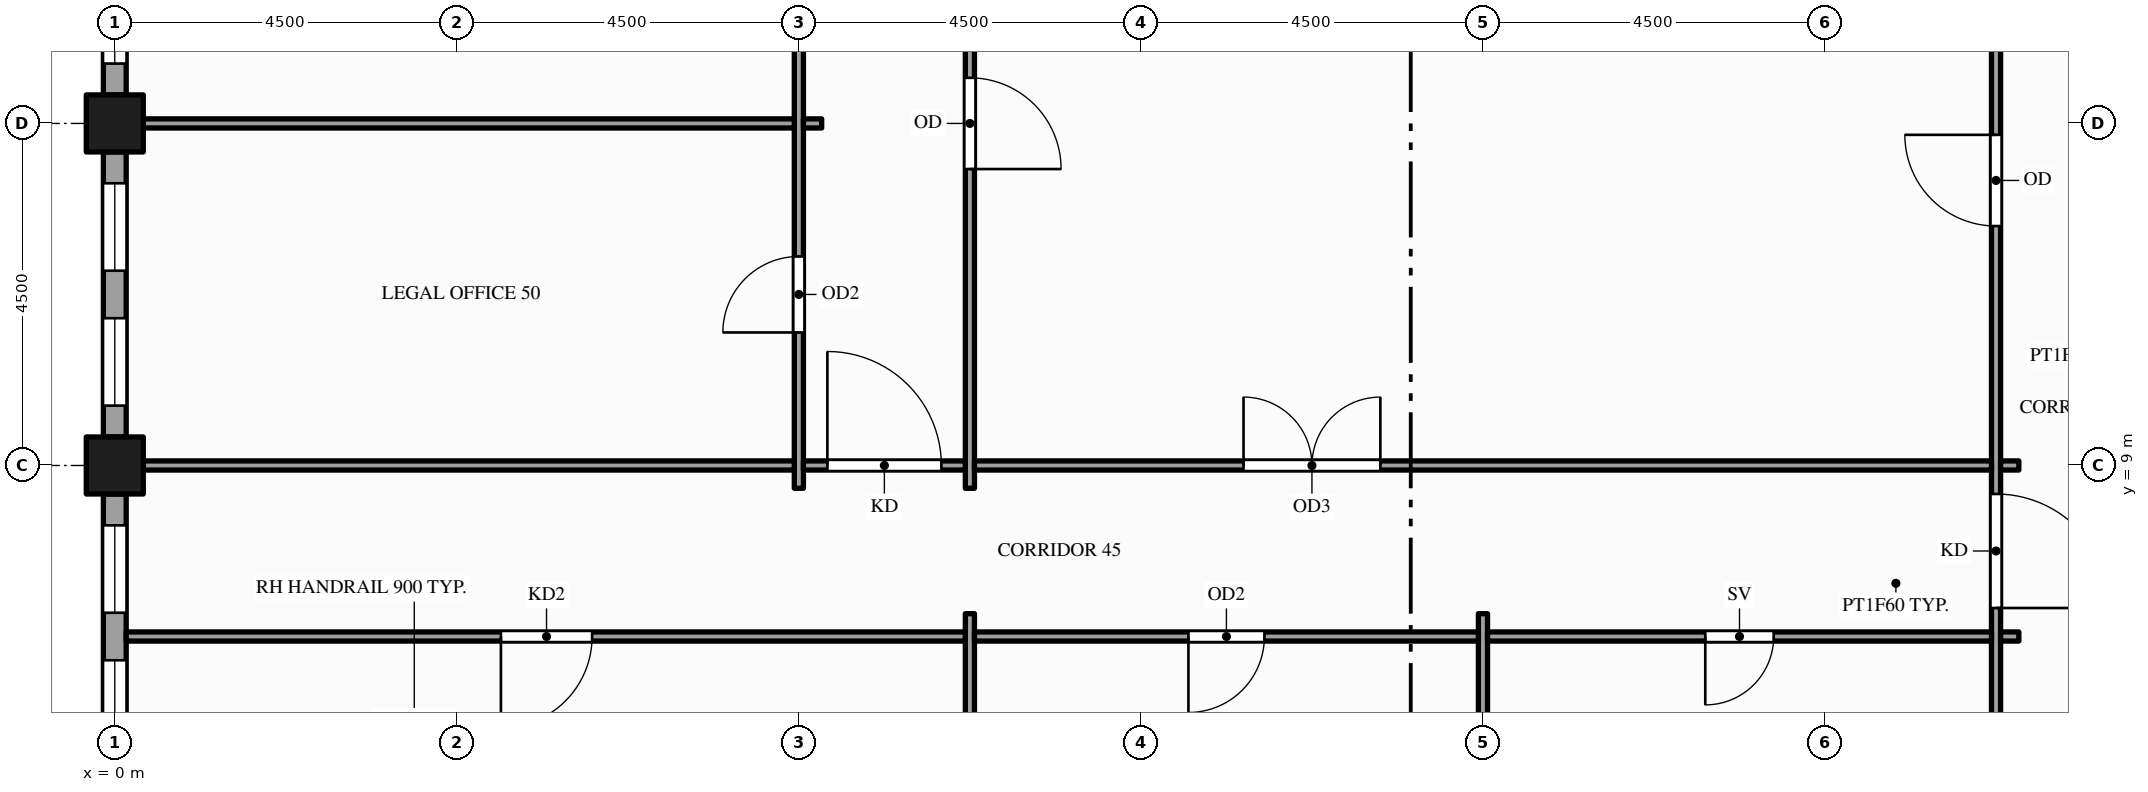
"""IFC4 building model, lengths in metres.
Left out: names, types, materials, properties, quantities, classifications, styles, units other than length and angle.
Written with IfcOpenShell. Run it as: python <this file> out.ifc"""

import sys

from ifc_helpers import new_model, si_unit, direction, frame, frame_2d, origin, origin_2d, place, context, subcontext, project, spatial, rectangle, hollow_rectangle, extrude, element, fill, save


model = new_model("IFC4")
c1 = context("Model", 3, precision=1e-05, world=origin(), true_north=direction((0.0, 1.0)))
c2 = subcontext(c1, "Body", "Model", "MODEL_VIEW")
j1 = project(units=[si_unit("LENGTHUNIT", "METRE"), si_unit("PLANEANGLEUNIT", "RADIAN")], contexts=[c1])
p1 = place(None, origin())
s1 = spatial("IfcSite", under=j1, at=p1, CompositionType="ELEMENT")
p2 = place(p1, origin())
s2 = spatial("IfcBuilding", under=s1, at=p2, CompositionType="ELEMENT")
p3 = place(p2, frame((0.0, 0.0, 223.0)))
s3 = spatial("IfcBuildingStorey", under=s2, at=p3, CompositionType="ELEMENT", Elevation=223.0)
for number, where, z_axis, x_axis in (
    (1, (0.0, 9.0, -0.15), (0.0, 0.0, 1.0), (1.0, 0.0, 0.0)),
    (2, (0.0, 13.5, -0.15), (0.0, 0.0, 1.0), (1.0, 0.0, 0.0)),
):
    element("IfcColumn", number, at=place(p3, frame(where, z_axis=z_axis, x_axis=x_axis)), inside=s3, PredefinedType="COLUMN", context=c2, shape_type="SweptSolid", body=[
        extrude(hollow_rectangle(XDim=0.75, YDim=0.75, WallThickness=0.036, at=origin_2d()), origin(), (0.0, 0.0, 1.0), 4.0),
    ])
p4 = place(p3, frame((0.0, 17.625, 0.0), z_axis=(0.0, 0.0, 1.0), x_axis=(0.0, -1.0, 0.0)))
e3 = element("IfcWall", 3, at=p4, inside=s3, PredefinedType="STANDARD", context=c2, shape_type="SweptSolid", body=[
    extrude(rectangle(XDim=3.75, YDim=0.3, at=frame_2d((1.875, 0.0))), origin(), (0.0, 0.0, 1.0), 3.157),
])
p5 = place(p4, frame((0.413, 0.0, 0.9)))
e4 = element("IfcOpeningElement", 4, at=p5, cuts=e3, PredefinedType="OPENING", context=c2, shape_type="SweptSolid", body=[
    extrude(rectangle(XDim=1.15, YDim=2.0, at=frame_2d((0.575, 1.0))), frame((0.0, 0.16, 0.0), z_axis=(0.0, -1.0, 0.0), x_axis=(1.0, 0.0, 0.0)), (0.0, 0.0, 1.0), 0.32),
])
p6 = place(p4, frame((2.188, 0.0, 0.9)))
e5 = element("IfcOpeningElement", 5, at=p6, cuts=e3, PredefinedType="OPENING", context=c2, shape_type="SweptSolid", body=[
    extrude(rectangle(XDim=1.15, YDim=2.0, at=frame_2d((0.575, 1.0))), frame((0.0, 0.16, 0.0), z_axis=(0.0, -1.0, 0.0), x_axis=(1.0, 0.0, 0.0)), (0.0, 0.0, 1.0), 0.32),
])
p7 = place(p3, frame((0.0, 13.125, 0.0), z_axis=(0.0, 0.0, 1.0), x_axis=(0.0, -1.0, 0.0)))
e6 = element("IfcWall", 6, at=p7, inside=s3, PredefinedType="STANDARD", context=c2, shape_type="SweptSolid", body=[
    extrude(rectangle(XDim=3.75, YDim=0.3, at=frame_2d((1.875, 0.0))), origin(), (0.0, 0.0, 1.0), 3.157),
])
p8 = place(p7, frame((0.413, 0.0, 0.9)))
e7 = element("IfcOpeningElement", 7, at=p8, cuts=e6, PredefinedType="OPENING", context=c2, shape_type="SweptSolid", body=[
    extrude(rectangle(XDim=1.15, YDim=2.0, at=frame_2d((0.575, 1.0))), frame((0.0, 0.16, 0.0), z_axis=(0.0, -1.0, 0.0), x_axis=(1.0, 0.0, 0.0)), (0.0, 0.0, 1.0), 0.32),
])
p9 = place(p7, frame((2.188, 0.0, 0.9)))
e8 = element("IfcOpeningElement", 8, at=p9, cuts=e6, PredefinedType="OPENING", context=c2, shape_type="SweptSolid", body=[
    extrude(rectangle(XDim=1.15, YDim=2.0, at=frame_2d((0.575, 1.0))), frame((0.0, 0.16, 0.0), z_axis=(0.0, -1.0, 0.0), x_axis=(1.0, 0.0, 0.0)), (0.0, 0.0, 1.0), 0.32),
])
p10 = place(p3, frame((0.0, 8.625, 0.0), z_axis=(0.0, 0.0, 1.0), x_axis=(0.0, -1.0, 0.0)))
e9 = element("IfcWall", 9, at=p10, inside=s3, PredefinedType="STANDARD", context=c2, shape_type="SweptSolid", body=[
    extrude(rectangle(XDim=3.75, YDim=0.3, at=frame_2d((1.875, 0.0))), origin(), (0.0, 0.0, 1.0), 3.157),
])
p11 = place(p10, frame((0.413, 0.0, 0.9)))
e10 = element("IfcOpeningElement", 10, at=p11, cuts=e9, PredefinedType="OPENING", context=c2, shape_type="SweptSolid", body=[
    extrude(rectangle(XDim=1.15, YDim=2.0, at=frame_2d((0.575, 1.0))), frame((0.0, 0.16, 0.0), z_axis=(0.0, -1.0, 0.0), x_axis=(1.0, 0.0, 0.0)), (0.0, 0.0, 1.0), 0.32),
])
p12 = place(p10, frame((2.188, 0.0, 0.9)))
e11 = element("IfcOpeningElement", 11, at=p12, cuts=e9, PredefinedType="OPENING", context=c2, shape_type="SweptSolid", body=[
    extrude(rectangle(XDim=1.15, YDim=2.0, at=frame_2d((0.575, 1.0))), frame((0.0, 0.16, 0.0), z_axis=(0.0, -1.0, 0.0), x_axis=(1.0, 0.0, 0.0)), (0.0, 0.0, 1.0), 0.32),
])
p13 = place(p3, frame((9.0, 8.7, 0.0), z_axis=(0.0, 0.0, 1.0), x_axis=(0.0, 1.0, 0.0)))
e12 = element("IfcWall", 12, at=p13, inside=s3, PredefinedType="PARTITIONING", context=c2, shape_type="SweptSolid", body=[
    extrude(rectangle(XDim=23.1, YDim=0.12, at=frame_2d((11.55, 0.0))), origin(), (0.0, 0.0, 1.0), 2.6),
])
p14 = place(p13, frame((2.05, 0.0, 0.0)))
e13 = element("IfcOpeningElement", 13, at=p14, cuts=e12, PredefinedType="OPENING", context=c2, shape_type="SweptSolid", body=[
    extrude(rectangle(XDim=1.0, YDim=2.1, at=frame_2d((0.5, 1.05))), frame((0.0, 0.07, 0.0), z_axis=(0.0, -1.0, 0.0), x_axis=(1.0, 0.0, 0.0)), (0.0, 0.0, 1.0), 0.14),
])
p15 = place(p13, frame((7.675, 0.0, 0.0)))
e14 = element("IfcOpeningElement", 14, at=p15, cuts=e12, PredefinedType="OPENING", context=c2, shape_type="SweptSolid", body=[
    extrude(rectangle(XDim=1.0, YDim=2.1, at=frame_2d((0.5, 1.05))), frame((0.0, 0.07, 0.0), z_axis=(0.0, -1.0, 0.0), x_axis=(1.0, 0.0, 0.0)), (0.0, 0.0, 1.0), 0.14),
])
p16 = place(p13, frame((14.455, 0.0, 0.0)))
e15 = element("IfcOpeningElement", 15, at=p16, cuts=e12, PredefinedType="OPENING", context=c2, shape_type="SweptSolid", body=[
    extrude(rectangle(XDim=1.0, YDim=2.1, at=frame_2d((0.5, 1.05))), frame((0.0, 0.07, 0.0), z_axis=(0.0, -1.0, 0.0), x_axis=(1.0, 0.0, 0.0)), (0.0, 0.0, 1.0), 0.14),
])
p17 = place(p3, frame((11.25, 0.15, 0.0), z_axis=(0.0, 0.0, 1.0), x_axis=(0.0, 1.0, 0.0)))
e16 = element("IfcWall", 16, at=p17, inside=s3, PredefinedType="PARTITIONING", context=c2, shape_type="SweptSolid", body=[
    extrude(rectangle(XDim=6.9, YDim=0.12, at=frame_2d((3.45, 0.0))), origin(), (0.0, 0.0, 1.0), 2.87),
])
p18 = place(p3, frame((11.25, 8.7, 0.0), z_axis=(0.0, 0.0, 1.0), x_axis=(0.0, 1.0, 0.0)))
e17 = element("IfcWall", 17, at=p18, inside=s3, PredefinedType="PARTITIONING", context=c2, shape_type="SweptSolid", body=[
    extrude(rectangle(XDim=23.1, YDim=0.12, at=frame_2d((11.55, 0.0))), origin(), (0.0, 0.0, 1.0), 2.6),
])
p19 = place(p18, frame((18.825, 0.0, 0.0)))
e18 = element("IfcOpeningElement", 18, at=p19, cuts=e17, PredefinedType="OPENING", context=c2, shape_type="SweptSolid", body=[
    extrude(rectangle(XDim=1.2, YDim=2.1, at=frame_2d((0.6, 1.05))), frame((0.0, 0.07, 0.0), z_axis=(0.0, -1.0, 0.0), x_axis=(1.0, 0.0, 0.0)), (0.0, 0.0, 1.0), 0.14),
])
p20 = place(p18, frame((4.2, 0.0, 0.0)))
e19 = element("IfcOpeningElement", 19, at=p20, cuts=e17, PredefinedType="OPENING", context=c2, shape_type="SweptSolid", body=[
    extrude(rectangle(XDim=1.2, YDim=2.1, at=frame_2d((0.6, 1.05))), frame((0.0, 0.07, 0.0), z_axis=(0.0, -1.0, 0.0), x_axis=(1.0, 0.0, 0.0)), (0.0, 0.0, 1.0), 0.14),
])
p21 = place(p3, frame((18.0, 0.15, 0.0), z_axis=(0.0, 0.0, 1.0), x_axis=(0.0, 1.0, 0.0)))
e20 = element("IfcWall", 20, at=p21, inside=s3, PredefinedType="PARTITIONING", context=c2, shape_type="SweptSolid", body=[
    extrude(rectangle(XDim=6.9, YDim=0.12, at=frame_2d((3.45, 0.0))), origin(), (0.0, 0.0, 1.0), 2.87),
])
p22 = place(p3, frame((24.75, -1.35, 0.0), z_axis=(0.0, 0.0, 1.0), x_axis=(0.0, 1.0, 0.0)))
e21 = element("IfcWall", 21, at=p22, inside=s3, PredefinedType="PARTITIONING", context=c2, shape_type="SweptSolid", body=[
    extrude(rectangle(XDim=24.101, YDim=0.12, at=frame_2d((12.05, 0.0))), origin(), (0.0, 0.0, 1.0), 2.76),
])
p23 = place(p22, frame((8.475, 0.0, 0.0)))
e22 = element("IfcOpeningElement", 22, at=p23, cuts=e21, PredefinedType="OPENING", context=c2, shape_type="SweptSolid", body=[
    extrude(rectangle(XDim=1.5, YDim=2.1, at=frame_2d((0.75, 1.05))), frame((0.0, 0.07, 0.0), z_axis=(0.0, -1.0, 0.0), x_axis=(1.0, 0.0, 0.0)), (0.0, 0.0, 1.0), 0.14),
])
p24 = place(p22, frame((13.5, 0.0, 0.0)))
e23 = element("IfcOpeningElement", 23, at=p24, cuts=e21, PredefinedType="OPENING", context=c2, shape_type="SweptSolid", body=[
    extrude(rectangle(XDim=1.2, YDim=2.1, at=frame_2d((0.6, 1.05))), frame((0.0, 0.07, 0.0), z_axis=(0.0, -1.0, 0.0), x_axis=(1.0, 0.0, 0.0)), (0.0, 0.0, 1.0), 0.14),
])
p25 = place(p3, frame((0.15, 6.75, 0.0), z_axis=(0.0, 0.0, 1.0), x_axis=(1.0, 0.0, 0.0)))
e24 = element("IfcWall", 24, at=p25, inside=s3, PredefinedType="PARTITIONING", context=c2, shape_type="SweptSolid", body=[
    extrude(rectangle(XDim=11.04, YDim=0.12, at=frame_2d((5.52, 0.0))), origin(), (0.0, 0.0, 1.0), 2.87),
])
p26 = place(p25, frame((4.93, 0.0, 0.0)))
e25 = element("IfcOpeningElement", 25, at=p26, cuts=e24, PredefinedType="OPENING", context=c2, shape_type="SweptSolid", body=[
    extrude(rectangle(XDim=1.2, YDim=2.1, at=frame_2d((0.6, 1.05))), frame((0.0, 0.07, 0.0), z_axis=(0.0, -1.0, 0.0), x_axis=(1.0, 0.0, 0.0)), (0.0, 0.0, 1.0), 0.14),
])
p27 = place(p3, frame((11.31, 6.75, 0.0), z_axis=(0.0, 0.0, 1.0), x_axis=(1.0, 0.0, 0.0)))
e26 = element("IfcWall", 26, at=p27, inside=s3, PredefinedType="PARTITIONING", context=c2, shape_type="SweptSolid", body=[
    extrude(rectangle(XDim=6.63, YDim=0.12, at=frame_2d((3.315, 0.0))), origin(), (0.0, 0.0, 1.0), 2.87),
])
p28 = place(p27, frame((2.815, 0.0, 0.0)))
e27 = element("IfcOpeningElement", 27, at=p28, cuts=e26, PredefinedType="OPENING", context=c2, shape_type="SweptSolid", body=[
    extrude(rectangle(XDim=1.0, YDim=2.1, at=frame_2d((0.5, 1.05))), frame((0.0, 0.07, 0.0), z_axis=(0.0, -1.0, 0.0), x_axis=(1.0, 0.0, 0.0)), (0.0, 0.0, 1.0), 0.14),
])
p29 = place(p3, frame((18.06, 6.75, 0.0), z_axis=(0.0, 0.0, 1.0), x_axis=(1.0, 0.0, 0.0)))
e28 = element("IfcWall", 28, at=p29, inside=s3, PredefinedType="PARTITIONING", context=c2, shape_type="SweptSolid", body=[
    extrude(rectangle(XDim=6.63, YDim=0.12, at=frame_2d((3.315, 0.0))), origin(), (0.0, 0.0, 1.0), 2.76),
])
p30 = place(p29, frame((2.865, 0.0, 0.0)))
e29 = element("IfcOpeningElement", 29, at=p30, cuts=e28, PredefinedType="OPENING", context=c2, shape_type="SweptSolid", body=[
    extrude(rectangle(XDim=0.9, YDim=2.1, at=frame_2d((0.45, 1.05))), frame((0.0, 0.07, 0.0), z_axis=(0.0, -1.0, 0.0), x_axis=(1.0, 0.0, 0.0)), (0.0, 0.0, 1.0), 0.14),
])
p31 = place(p3, frame((24.81, 6.75, 0.0), z_axis=(0.0, 0.0, 1.0), x_axis=(1.0, 0.0, 0.0)))
e30 = element("IfcWall", 30, at=p31, inside=s3, PredefinedType="PARTITIONING", context=c2, shape_type="SweptSolid", body=[
    extrude(rectangle(XDim=0.24, YDim=0.12, at=frame_2d((0.12, 0.0))), origin(), (0.0, 0.0, 1.0), 2.76),
])
p32 = place(p3, frame((0.15, 9.0, 0.0), z_axis=(0.0, 0.0, 1.0), x_axis=(1.0, 0.0, 0.0)))
e31 = element("IfcWall", 31, at=p32, inside=s3, PredefinedType="PARTITIONING", context=c2, shape_type="SweptSolid", body=[
    extrude(rectangle(XDim=8.79, YDim=0.12, at=frame_2d((4.395, 0.0))), origin(), (0.0, 0.0, 1.0), 2.87),
])
p33 = place(p3, frame((9.06, 9.0, 0.0), z_axis=(0.0, 0.0, 1.0), x_axis=(1.0, 0.0, 0.0)))
e32 = element("IfcWall", 32, at=p33, inside=s3, PredefinedType="PARTITIONING", context=c2, shape_type="SweptSolid", body=[
    extrude(rectangle(XDim=2.13, YDim=0.12, at=frame_2d((1.065, 0.0))), origin(), (0.0, 0.0, 1.0), 2.87),
])
p34 = place(p33, frame((0.315, 0.0, 0.0)))
e33 = element("IfcOpeningElement", 33, at=p34, cuts=e32, PredefinedType="OPENING", context=c2, shape_type="SweptSolid", body=[
    extrude(rectangle(XDim=1.5, YDim=2.1, at=frame_2d((0.75, 1.05))), frame((0.0, 0.07, 0.0), z_axis=(0.0, -1.0, 0.0), x_axis=(1.0, 0.0, 0.0)), (0.0, 0.0, 1.0), 0.14),
])
p35 = place(p3, frame((11.31, 9.0, 0.0), z_axis=(0.0, 0.0, 1.0), x_axis=(1.0, 0.0, 0.0)))
e34 = element("IfcWall", 34, at=p35, inside=s3, PredefinedType="PARTITIONING", context=c2, shape_type="SweptSolid", body=[
    extrude(rectangle(XDim=13.38, YDim=0.12, at=frame_2d((6.69, 0.0))), origin(), (0.0, 0.0, 1.0), 2.76),
])
p36 = place(p35, frame((3.54, 0.0, 0.0)))
e35 = element("IfcOpeningElement", 35, at=p36, cuts=e34, PredefinedType="OPENING", context=c2, shape_type="SweptSolid", body=[
    extrude(rectangle(XDim=1.8, YDim=2.1, at=frame_2d((0.9, 1.05))), frame((0.0, 0.07, 0.0), z_axis=(0.0, -1.0, 0.0), x_axis=(1.0, 0.0, 0.0)), (0.0, 0.0, 1.0), 0.14),
])
p37 = place(p3, frame((24.81, 9.0, 0.0), z_axis=(0.0, 0.0, 1.0), x_axis=(1.0, 0.0, 0.0)))
e36 = element("IfcWall", 36, at=p37, inside=s3, PredefinedType="PARTITIONING", context=c2, shape_type="SweptSolid", body=[
    extrude(rectangle(XDim=0.24, YDim=0.12, at=frame_2d((0.12, 0.0))), origin(), (0.0, 0.0, 1.0), 2.76),
])
p38 = place(p3, frame((0.15, 13.5, 0.0), z_axis=(0.0, 0.0, 1.0), x_axis=(1.0, 0.0, 0.0)))
e37 = element("IfcWall", 37, at=p38, inside=s3, PredefinedType="PARTITIONING", context=c2, shape_type="SweptSolid", body=[
    extrude(rectangle(XDim=8.79, YDim=0.12, at=frame_2d((4.395, 0.0))), origin(), (0.0, 0.0, 1.0), 2.87),
])
p39 = place(p3, frame((9.06, 13.5, 0.0), z_axis=(0.0, 0.0, 1.0), x_axis=(1.0, 0.0, 0.0)))
e38 = element("IfcWall", 38, at=p39, inside=s3, PredefinedType="PARTITIONING", context=c2, shape_type="SweptSolid", body=[
    extrude(rectangle(XDim=0.24, YDim=0.12, at=frame_2d((0.12, 0.0))), origin(), (0.0, 0.0, 1.0), 2.87),
])
p40 = place(p6, origin())
e39 = element("IfcWindow", 39, at=p40, inside=s3, PartitioningType="SINGLE_PANEL", PredefinedType="WINDOW", context=c2, shape_type="SweptSolid", body=[
    extrude(rectangle(XDim=1.15, YDim=2.0, at=frame_2d((0.575, 1.0))), frame((0.0, 0.03, 0.0), z_axis=(0.0, -1.0, 0.0), x_axis=(1.0, 0.0, 0.0)), (0.0, 0.0, 1.0), 0.06),
])
fill(e5, e39)
p41 = place(p8, origin())
e40 = element("IfcWindow", 40, at=p41, inside=s3, PartitioningType="SINGLE_PANEL", PredefinedType="WINDOW", context=c2, shape_type="SweptSolid", body=[
    extrude(rectangle(XDim=1.15, YDim=2.0, at=frame_2d((0.575, 1.0))), frame((0.0, 0.03, 0.0), z_axis=(0.0, -1.0, 0.0), x_axis=(1.0, 0.0, 0.0)), (0.0, 0.0, 1.0), 0.06),
])
fill(e7, e40)
p42 = place(p9, origin())
e41 = element("IfcWindow", 41, at=p42, inside=s3, PartitioningType="SINGLE_PANEL", PredefinedType="WINDOW", context=c2, shape_type="SweptSolid", body=[
    extrude(rectangle(XDim=1.15, YDim=2.0, at=frame_2d((0.575, 1.0))), frame((0.0, 0.03, 0.0), z_axis=(0.0, -1.0, 0.0), x_axis=(1.0, 0.0, 0.0)), (0.0, 0.0, 1.0), 0.06),
])
fill(e8, e41)
p43 = place(p11, origin())
e42 = element("IfcWindow", 42, at=p43, inside=s3, PartitioningType="SINGLE_PANEL", PredefinedType="WINDOW", context=c2, shape_type="SweptSolid", body=[
    extrude(rectangle(XDim=1.15, YDim=2.0, at=frame_2d((0.575, 1.0))), frame((0.0, 0.03, 0.0), z_axis=(0.0, -1.0, 0.0), x_axis=(1.0, 0.0, 0.0)), (0.0, 0.0, 1.0), 0.06),
])
fill(e10, e42)
p44 = place(p12, origin())
e43 = element("IfcWindow", 43, at=p44, inside=s3, PartitioningType="SINGLE_PANEL", PredefinedType="WINDOW", context=c2, shape_type="SweptSolid", body=[
    extrude(rectangle(XDim=1.15, YDim=2.0, at=frame_2d((0.575, 1.0))), frame((0.0, 0.03, 0.0), z_axis=(0.0, -1.0, 0.0), x_axis=(1.0, 0.0, 0.0)), (0.0, 0.0, 1.0), 0.06),
])
fill(e11, e43)
p45 = place(p23, origin())
e44 = element("IfcDoor", 44, at=p45, inside=s3, OperationType="SINGLE_SWING_LEFT", PredefinedType="DOOR", context=c2, shape_type="SweptSolid", body=[
    extrude(rectangle(XDim=1.5, YDim=2.1, at=frame_2d((0.75, 1.05))), frame((0.0, 0.025, 0.0), z_axis=(0.0, -1.0, 0.0), x_axis=(1.0, 0.0, 0.0)), (0.0, 0.0, 1.0), 0.05),
])
fill(e22, e44)
p46 = place(p26, origin())
e45 = element("IfcDoor", 45, at=p46, inside=s3, OperationType="SINGLE_SWING_LEFT", PredefinedType="DOOR", context=c2, shape_type="SweptSolid", body=[
    extrude(rectangle(XDim=1.2, YDim=2.1, at=frame_2d((0.6, 1.05))), frame((0.0, 0.025, 0.0), z_axis=(0.0, -1.0, 0.0), x_axis=(1.0, 0.0, 0.0)), (0.0, 0.0, 1.0), 0.05),
])
fill(e25, e45)
p47 = place(p28, origin())
e46 = element("IfcDoor", 46, at=p47, inside=s3, OperationType="SINGLE_SWING_LEFT", PredefinedType="DOOR", context=c2, shape_type="SweptSolid", body=[
    extrude(rectangle(XDim=1.0, YDim=2.1, at=frame_2d((0.5, 1.05))), frame((0.0, 0.025, 0.0), z_axis=(0.0, -1.0, 0.0), x_axis=(1.0, 0.0, 0.0)), (0.0, 0.0, 1.0), 0.05),
])
fill(e27, e46)
p48 = place(p30, origin())
e47 = element("IfcDoor", 47, at=p48, inside=s3, OperationType="SINGLE_SWING_LEFT", PredefinedType="DOOR", context=c2, shape_type="SweptSolid", body=[
    extrude(rectangle(XDim=0.9, YDim=2.1, at=frame_2d((0.45, 1.05))), frame((0.0, 0.025, 0.0), z_axis=(0.0, -1.0, 0.0), x_axis=(1.0, 0.0, 0.0)), (0.0, 0.0, 1.0), 0.05),
])
fill(e29, e47)
p49 = place(p36, origin())
e48 = element("IfcDoor", 48, at=p49, inside=s3, OperationType="DOUBLE_DOOR_SINGLE_SWING", PredefinedType="DOOR", context=c2, shape_type="SweptSolid", body=[
    extrude(rectangle(XDim=1.8, YDim=2.1, at=frame_2d((0.9, 1.05))), frame((0.0, 0.025, 0.0), z_axis=(0.0, -1.0, 0.0), x_axis=(1.0, 0.0, 0.0)), (0.0, 0.0, 1.0), 0.05),
])
fill(e35, e48)
p50 = place(p34, origin())
e49 = element("IfcDoor", 49, at=p50, inside=s3, OperationType="SINGLE_SWING_LEFT", PredefinedType="DOOR", context=c2, shape_type="SweptSolid", body=[
    extrude(rectangle(XDim=1.5, YDim=2.1, at=frame_2d((0.75, 1.05))), frame((0.0, 0.025, 0.0), z_axis=(0.0, -1.0, 0.0), x_axis=(1.0, 0.0, 0.0)), (0.0, 0.0, 1.0), 0.05),
])
fill(e33, e49)
p51 = place(p14, origin())
e50 = element("IfcDoor", 50, at=p51, inside=s3, OperationType="SINGLE_SWING_LEFT", PredefinedType="DOOR", context=c2, shape_type="SweptSolid", body=[
    extrude(rectangle(XDim=1.0, YDim=2.1, at=frame_2d((0.5, 1.05))), frame((0.0, 0.025, 0.0), z_axis=(0.0, -1.0, 0.0), x_axis=(1.0, 0.0, 0.0)), (0.0, 0.0, 1.0), 0.05),
])
fill(e13, e50)
p52 = place(p20, origin())
e51 = element("IfcDoor", 51, at=p52, inside=s3, OperationType="SINGLE_SWING_LEFT", PredefinedType="DOOR", context=c2, shape_type="SweptSolid", body=[
    extrude(rectangle(XDim=1.2, YDim=2.1, at=frame_2d((0.6, 1.05))), frame((0.0, 0.025, 0.0), z_axis=(0.0, -1.0, 0.0), x_axis=(1.0, 0.0, 0.0)), (0.0, 0.0, 1.0), 0.05),
])
fill(e19, e51)
p53 = place(p24, origin())
e52 = element("IfcDoor", 52, at=p53, inside=s3, OperationType="SINGLE_SWING_RIGHT", PredefinedType="DOOR", context=c2, shape_type="SweptSolid", body=[
    extrude(rectangle(XDim=1.2, YDim=2.1, at=frame_2d((0.6, 1.05))), frame((0.0, 0.025, 0.0), z_axis=(0.0, -1.0, 0.0), x_axis=(1.0, 0.0, 0.0)), (0.0, 0.0, 1.0), 0.05),
])
fill(e23, e52)
save(model, sys.argv[1])
